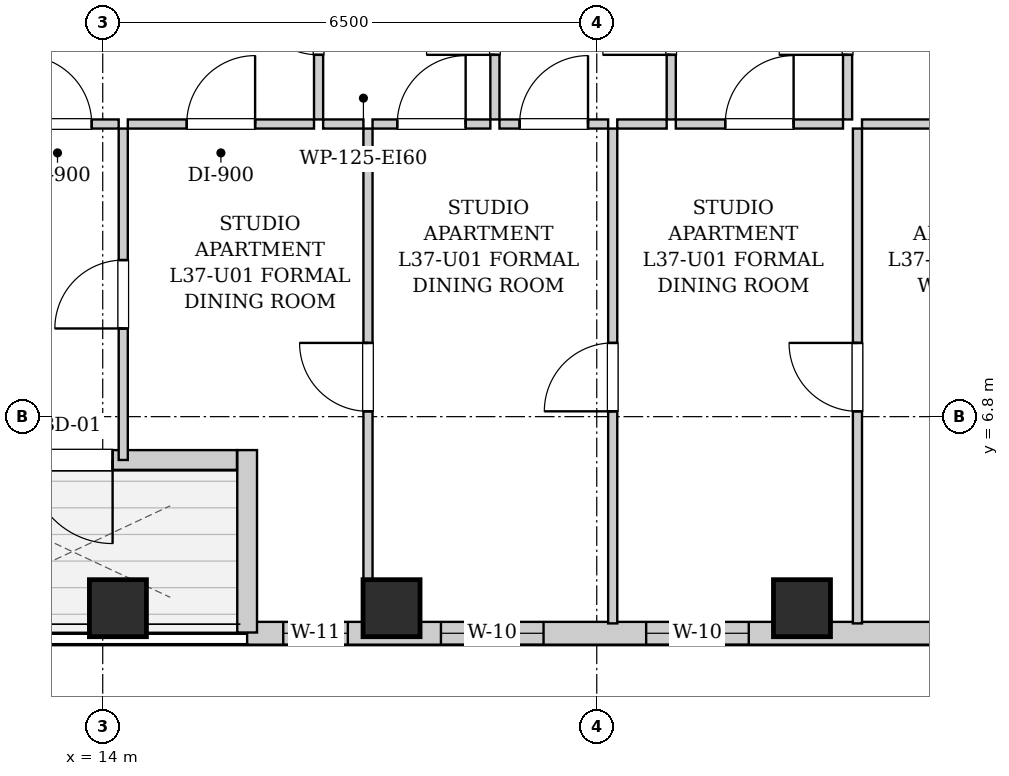
"""IFC4 building model, lengths in metres.
Left out: names, types, materials, properties, quantities, classifications, styles, units other than length and angle.
Written with IfcOpenShell. Run it as: python <this file> out.ifc"""

import sys

from ifc_helpers import new_model, si_unit, direction, frame, frame_2d, origin, origin_2d, place, context, subcontext, project, spatial, rectangle, extrude, element, fill, save


model = new_model("IFC4")
c1 = context("Model", 3, precision=1e-05, world=origin(), true_north=direction((0.0, 1.0)))
c2 = subcontext(c1, "Body", "Model", "MODEL_VIEW")
j1 = project(units=[si_unit("LENGTHUNIT", "METRE"), si_unit("PLANEANGLEUNIT", "RADIAN")], contexts=[c1])
p1 = place(None, origin())
s1 = spatial("IfcSite", under=j1, at=p1, CompositionType="ELEMENT")
p2 = place(p1, origin())
s2 = spatial("IfcBuilding", under=s1, at=p2, CompositionType="ELEMENT")
p3 = place(p2, frame((0.0, 0.0, 130.9)))
s3 = spatial("IfcBuildingStorey", under=s2, at=p3, CompositionType="ELEMENT", Elevation=130.9)
for number, where, z_axis, x_axis in (
    (1, (14.2, 4.28, 0.0), (0.0, 0.0, 1.0), (1.0, 0.0, 0.0)),
    (2, (17.8, 4.28, 0.0), (0.0, 0.0, 1.0), (1.0, 0.0, 0.0)),
    (3, (23.2, 4.28, 0.0), (0.0, 0.0, 1.0), (1.0, 0.0, 0.0)),
):
    element("IfcColumn", number, at=place(p3, frame(where, z_axis=z_axis, x_axis=x_axis)), inside=s3, PredefinedType="COLUMN", context=c2, shape_type="SweptSolid", body=[
        extrude(rectangle(XDim=0.75, YDim=0.75, at=origin_2d()), origin(), (0.0, 0.0, 1.0), 3.25),
    ])
p4 = place(p3, frame((31.5, 3.95, 0.0), z_axis=(0.0, 0.0, 1.0), x_axis=(-1.0, 0.0, 0.0)))
e4 = element("IfcWall", 4, at=p4, inside=s3, PredefinedType="SOLIDWALL", context=c2, shape_type="SweptSolid", body=[
    extrude(rectangle(XDim=15.6, YDim=0.3, at=frame_2d((7.8, 0.0))), origin(), (0.0, 0.0, 1.0), 2.99),
])
p5 = place(p4, frame((14.275, 0.0, 0.55)))
e5 = element("IfcOpeningElement", 5, at=p5, cuts=e4, PredefinedType="OPENING", context=c2, shape_type="SweptSolid", body=[
    extrude(rectangle(XDim=0.85, YDim=1.2, at=frame_2d((0.425, 0.6))), frame((0.0, 0.16, 0.0), z_axis=(0.0, -1.0, 0.0), x_axis=(1.0, 0.0, 0.0)), (0.0, 0.0, 1.0), 0.32),
])
p6 = place(p4, frame((11.7, 0.0, 0.55)))
e6 = element("IfcOpeningElement", 6, at=p6, cuts=e4, PredefinedType="OPENING", context=c2, shape_type="SweptSolid", body=[
    extrude(rectangle(XDim=1.35, YDim=1.2, at=frame_2d((0.675, 0.6))), frame((0.0, 0.16, 0.0), z_axis=(0.0, -1.0, 0.0), x_axis=(1.0, 0.0, 0.0)), (0.0, 0.0, 1.0), 0.32),
])
p7 = place(p4, frame((9.0, 0.0, 0.55)))
e7 = element("IfcOpeningElement", 7, at=p7, cuts=e4, PredefinedType="OPENING", context=c2, shape_type="SweptSolid", body=[
    extrude(rectangle(XDim=1.35, YDim=1.2, at=frame_2d((0.675, 0.6))), frame((0.0, 0.16, 0.0), z_axis=(0.0, -1.0, 0.0), x_axis=(1.0, 0.0, 0.0)), (0.0, 0.0, 1.0), 0.32),
])
p8 = place(p4, frame((2.1, 0.0, 0.55)))
e8 = element("IfcOpeningElement", 8, at=p8, cuts=e4, PredefinedType="OPENING", context=c2, shape_type="SweptSolid", body=[
    extrude(rectangle(XDim=1.35, YDim=1.2, at=frame_2d((0.675, 0.6))), frame((0.0, 0.16, 0.0), z_axis=(0.0, -1.0, 0.0), x_axis=(1.0, 0.0, 0.0)), (0.0, 0.0, 1.0), 0.32),
])
p9 = place(p4, frame((0.23, 0.0, 0.55)))
e9 = element("IfcOpeningElement", 9, at=p9, cuts=e4, PredefinedType="OPENING", context=c2, shape_type="SweptSolid", body=[
    extrude(rectangle(XDim=0.68, YDim=1.2, at=frame_2d((0.34, 0.6))), frame((0.0, 0.16, 0.0), z_axis=(0.0, -1.0, 0.0), x_axis=(1.0, 0.0, 0.0)), (0.0, 0.0, 1.0), 0.32),
])
p10 = place(p3, frame((15.9, 3.96, 0.0), z_axis=(0.0, 0.0, 1.0), x_axis=(0.0, 1.0, 0.0)))
e10 = element("IfcWall", 10, at=p10, inside=s3, PredefinedType="SOLIDWALL", context=c2, shape_type="SweptSolid", body=[
    extrude(rectangle(XDim=2.4, YDim=0.26, at=frame_2d((1.2, 0.0))), origin(), (0.0, 0.0, 1.0), 2.99),
])
p11 = place(p3, frame((15.766, 6.23, 0.0), z_axis=(0.0, 0.0, 1.0), x_axis=(-1.0, 0.0, 0.0)))
e11 = element("IfcWall", 11, at=p11, inside=s3, PredefinedType="SOLIDWALL", context=c2, shape_type="SweptSolid", body=[
    extrude(rectangle(XDim=4.332, YDim=0.26, at=frame_2d((2.166, 0.0))), origin(), (0.0, 0.0, 1.0), 2.99),
])
p12 = place(p11, frame((1.636, 0.0, 0.0)))
e12 = element("IfcOpeningElement", 12, at=p12, cuts=e11, PredefinedType="OPENING", context=c2, shape_type="SweptSolid", body=[
    extrude(rectangle(XDim=1.1, YDim=2.0, at=frame_2d((0.55, 1.0))), frame((0.0, 0.14, 0.0), z_axis=(0.0, -1.0, 0.0), x_axis=(1.0, 0.0, 0.0)), (0.0, 0.0, 1.0), 0.28),
])
p13 = place(p11, frame((2.896, 0.0, 0.55)))
e13 = element("IfcOpeningElement", 13, at=p13, cuts=e11, PredefinedType="OPENING", context=c2, shape_type="SweptSolid", body=[
    extrude(rectangle(XDim=0.85, YDim=1.2, at=frame_2d((0.425, 0.6))), frame((0.0, 0.14, 0.0), z_axis=(0.0, -1.0, 0.0), x_axis=(1.0, 0.0, 0.0)), (0.0, 0.0, 1.0), 0.28),
])
p14 = place(p3, frame((16.84, 10.71, 0.0), z_axis=(0.0, 0.0, 1.0), x_axis=(0.0, 1.0, 0.0)))
e14 = element("IfcWall", 14, at=p14, inside=s3, PredefinedType="PARTITIONING", context=c2, shape_type="SweptSolid", body=[
    extrude(rectangle(XDim=2.6, YDim=0.12, at=frame_2d((1.3, 0.0))), origin(), (0.0, 0.0, 1.0), 2.99),
])
p15 = place(p14, frame((0.85, 0.0, 0.0)))
e15 = element("IfcOpeningElement", 15, at=p15, cuts=e14, PredefinedType="OPENING", context=c2, shape_type="SweptSolid", body=[
    extrude(rectangle(XDim=0.9, YDim=2.05, at=frame_2d((0.45, 1.025))), frame((0.0, 0.07, 0.0), z_axis=(0.0, -1.0, 0.0), x_axis=(1.0, 0.0, 0.0)), (0.0, 0.0, 1.0), 0.14),
])
p16 = place(p3, frame((12.6, 10.65, 0.0), z_axis=(0.0, 0.0, 1.0), x_axis=(1.0, 0.0, 0.0)))
e16 = element("IfcWall", 16, at=p16, inside=s3, PredefinedType="PARTITIONING", context=c2, shape_type="SweptSolid", body=[
    extrude(rectangle(XDim=1.61, YDim=0.12, at=frame_2d((0.805, 0.0))), origin(), (0.0, 0.0, 1.0), 2.99),
])
p17 = place(p16, frame((0.355, 0.0, 0.0)))
e17 = element("IfcOpeningElement", 17, at=p17, cuts=e16, PredefinedType="OPENING", context=c2, shape_type="SweptSolid", body=[
    extrude(rectangle(XDim=0.9, YDim=2.05, at=frame_2d((0.45, 1.025))), frame((0.0, 0.07, 0.0), z_axis=(0.0, -1.0, 0.0), x_axis=(1.0, 0.0, 0.0)), (0.0, 0.0, 1.0), 0.14),
])
p18 = place(p3, frame((14.33, 10.65, 0.0), z_axis=(0.0, 0.0, 1.0), x_axis=(1.0, 0.0, 0.0)))
e18 = element("IfcWall", 18, at=p18, inside=s3, PredefinedType="PARTITIONING", context=c2, shape_type="SweptSolid", body=[
    extrude(rectangle(XDim=2.45, YDim=0.12, at=frame_2d((1.225, 0.0))), origin(), (0.0, 0.0, 1.0), 2.99),
])
p19 = place(p18, frame((0.775, 0.0, 0.0)))
e19 = element("IfcOpeningElement", 19, at=p19, cuts=e18, PredefinedType="OPENING", context=c2, shape_type="SweptSolid", body=[
    extrude(rectangle(XDim=0.9, YDim=2.05, at=frame_2d((0.45, 1.025))), frame((0.0, 0.07, 0.0), z_axis=(0.0, -1.0, 0.0), x_axis=(1.0, 0.0, 0.0)), (0.0, 0.0, 1.0), 0.14),
])
p20 = place(p3, frame((19.16, 10.71, 0.0), z_axis=(0.0, 0.0, 1.0), x_axis=(0.0, 1.0, 0.0)))
e20 = element("IfcWall", 20, at=p20, inside=s3, PredefinedType="PARTITIONING", context=c2, shape_type="SweptSolid", body=[
    extrude(rectangle(XDim=2.6, YDim=0.12, at=frame_2d((1.3, 0.0))), origin(), (0.0, 0.0, 1.0), 2.99),
])
p21 = place(p20, frame((0.85, 0.0, 0.0)))
e21 = element("IfcOpeningElement", 21, at=p21, cuts=e20, PredefinedType="OPENING", context=c2, shape_type="SweptSolid", body=[
    extrude(rectangle(XDim=0.9, YDim=2.05, at=frame_2d((0.45, 1.025))), frame((0.0, 0.07, 0.0), z_axis=(0.0, -1.0, 0.0), x_axis=(1.0, 0.0, 0.0)), (0.0, 0.0, 1.0), 0.14),
])
p22 = place(p3, frame((16.9, 10.65, 0.0), z_axis=(0.0, 0.0, 1.0), x_axis=(1.0, 0.0, 0.0)))
e22 = element("IfcWall", 22, at=p22, inside=s3, PredefinedType="PARTITIONING", context=c2, shape_type="SweptSolid", body=[
    extrude(rectangle(XDim=0.53, YDim=0.12, at=frame_2d((0.265, 0.0))), origin(), (0.0, 0.0, 1.0), 2.99),
])
p23 = place(p3, frame((17.55, 10.65, 0.0), z_axis=(0.0, 0.0, 1.0), x_axis=(1.0, 0.0, 0.0)))
e23 = element("IfcWall", 23, at=p23, inside=s3, PredefinedType="PARTITIONING", context=c2, shape_type="SweptSolid", body=[
    extrude(rectangle(XDim=1.55, YDim=0.12, at=frame_2d((0.775, 0.0))), origin(), (0.0, 0.0, 1.0), 2.99),
])
p24 = place(p23, frame((0.325, 0.0, 0.0)))
e24 = element("IfcOpeningElement", 24, at=p24, cuts=e23, PredefinedType="OPENING", context=c2, shape_type="SweptSolid", body=[
    extrude(rectangle(XDim=0.9, YDim=2.05, at=frame_2d((0.45, 1.025))), frame((0.0, 0.07, 0.0), z_axis=(0.0, -1.0, 0.0), x_axis=(1.0, 0.0, 0.0)), (0.0, 0.0, 1.0), 0.14),
])
p25 = place(p3, frame((21.48, 10.71, 0.0), z_axis=(0.0, 0.0, 1.0), x_axis=(0.0, 1.0, 0.0)))
e25 = element("IfcWall", 25, at=p25, inside=s3, PredefinedType="PARTITIONING", context=c2, shape_type="SweptSolid", body=[
    extrude(rectangle(XDim=2.6, YDim=0.12, at=frame_2d((1.3, 0.0))), origin(), (0.0, 0.0, 1.0), 2.99),
])
p26 = place(p25, frame((0.85, 0.0, 0.0)))
e26 = element("IfcOpeningElement", 26, at=p26, cuts=e25, PredefinedType="OPENING", context=c2, shape_type="SweptSolid", body=[
    extrude(rectangle(XDim=0.9, YDim=2.05, at=frame_2d((0.45, 1.025))), frame((0.0, 0.07, 0.0), z_axis=(0.0, -1.0, 0.0), x_axis=(1.0, 0.0, 0.0)), (0.0, 0.0, 1.0), 0.14),
])
p27 = place(p3, frame((19.22, 10.65, 0.0), z_axis=(0.0, 0.0, 1.0), x_axis=(1.0, 0.0, 0.0)))
e27 = element("IfcWall", 27, at=p27, inside=s3, PredefinedType="PARTITIONING", context=c2, shape_type="SweptSolid", body=[
    extrude(rectangle(XDim=1.43, YDim=0.12, at=frame_2d((0.715, 0.0))), origin(), (0.0, 0.0, 1.0), 2.99),
])
p28 = place(p27, frame((0.265, 0.0, 0.0)))
e28 = element("IfcOpeningElement", 28, at=p28, cuts=e27, PredefinedType="OPENING", context=c2, shape_type="SweptSolid", body=[
    extrude(rectangle(XDim=0.9, YDim=2.05, at=frame_2d((0.45, 1.025))), frame((0.0, 0.07, 0.0), z_axis=(0.0, -1.0, 0.0), x_axis=(1.0, 0.0, 0.0)), (0.0, 0.0, 1.0), 0.14),
])
p29 = place(p3, frame((20.77, 10.65, 0.0), z_axis=(0.0, 0.0, 1.0), x_axis=(1.0, 0.0, 0.0)))
e29 = element("IfcWall", 29, at=p29, inside=s3, PredefinedType="PARTITIONING", context=c2, shape_type="SweptSolid", body=[
    extrude(rectangle(XDim=0.65, YDim=0.12, at=frame_2d((0.325, 0.0))), origin(), (0.0, 0.0, 1.0), 2.99),
])
p30 = place(p3, frame((23.8, 10.71, 0.0), z_axis=(0.0, 0.0, 1.0), x_axis=(0.0, 1.0, 0.0)))
e30 = element("IfcWall", 30, at=p30, inside=s3, PredefinedType="PARTITIONING", context=c2, shape_type="SweptSolid", body=[
    extrude(rectangle(XDim=2.6, YDim=0.12, at=frame_2d((1.3, 0.0))), origin(), (0.0, 0.0, 1.0), 2.99),
])
p31 = place(p30, frame((0.85, 0.0, 0.0)))
e31 = element("IfcOpeningElement", 31, at=p31, cuts=e30, PredefinedType="OPENING", context=c2, shape_type="SweptSolid", body=[
    extrude(rectangle(XDim=0.9, YDim=2.05, at=frame_2d((0.45, 1.025))), frame((0.0, 0.07, 0.0), z_axis=(0.0, -1.0, 0.0), x_axis=(1.0, 0.0, 0.0)), (0.0, 0.0, 1.0), 0.14),
])
p32 = place(p3, frame((21.54, 10.65, 0.0), z_axis=(0.0, 0.0, 1.0), x_axis=(1.0, 0.0, 0.0)))
e32 = element("IfcWall", 32, at=p32, inside=s3, PredefinedType="PARTITIONING", context=c2, shape_type="SweptSolid", body=[
    extrude(rectangle(XDim=2.2, YDim=0.12, at=frame_2d((1.1, 0.0))), origin(), (0.0, 0.0, 1.0), 2.99),
])
p33 = place(p32, frame((0.65, 0.0, 0.0)))
e33 = element("IfcOpeningElement", 33, at=p33, cuts=e32, PredefinedType="OPENING", context=c2, shape_type="SweptSolid", body=[
    extrude(rectangle(XDim=0.9, YDim=2.05, at=frame_2d((0.45, 1.025))), frame((0.0, 0.07, 0.0), z_axis=(0.0, -1.0, 0.0), x_axis=(1.0, 0.0, 0.0)), (0.0, 0.0, 1.0), 0.14),
])
p34 = place(p3, frame((23.99, 10.65, 0.0), z_axis=(0.0, 0.0, 1.0), x_axis=(1.0, 0.0, 0.0)))
e34 = element("IfcWall", 34, at=p34, inside=s3, PredefinedType="PARTITIONING", context=c2, shape_type="SweptSolid", body=[
    extrude(rectangle(XDim=3.1, YDim=0.12, at=frame_2d((1.55, 0.0))), origin(), (0.0, 0.0, 1.0), 2.99),
])
p35 = place(p34, frame((1.1, 0.0, 0.0)))
e35 = element("IfcOpeningElement", 35, at=p35, cuts=e34, PredefinedType="OPENING", context=c2, shape_type="SweptSolid", body=[
    extrude(rectangle(XDim=0.9, YDim=2.05, at=frame_2d((0.45, 1.025))), frame((0.0, 0.07, 0.0), z_axis=(0.0, -1.0, 0.0), x_axis=(1.0, 0.0, 0.0)), (0.0, 0.0, 1.0), 0.14),
])
p36 = place(p3, frame((14.27, 6.23, 0.0), z_axis=(0.0, 0.0, 1.0), x_axis=(0.0, 1.0, 0.0)))
e36 = element("IfcWall", 36, at=p36, inside=s3, PredefinedType="PARTITIONING", context=c2, shape_type="SweptSolid", body=[
    extrude(rectangle(XDim=4.36, YDim=0.12, at=frame_2d((2.18, 0.0))), origin(), (0.0, 0.0, 1.0), 2.99),
])
p37 = place(p36, frame((1.73, 0.0, 0.0)))
e37 = element("IfcOpeningElement", 37, at=p37, cuts=e36, PredefinedType="OPENING", context=c2, shape_type="SweptSolid", body=[
    extrude(rectangle(XDim=0.9, YDim=2.05, at=frame_2d((0.45, 1.025))), frame((0.0, 0.07, 0.0), z_axis=(0.0, -1.0, 0.0), x_axis=(1.0, 0.0, 0.0)), (0.0, 0.0, 1.0), 0.14),
])
p38 = place(p3, frame((17.49, 4.08, 0.0), z_axis=(0.0, 0.0, 1.0), x_axis=(0.0, 1.0, 0.0)))
e38 = element("IfcWall", 38, at=p38, inside=s3, PredefinedType="PARTITIONING", context=c2, shape_type="SweptSolid", body=[
    extrude(rectangle(XDim=6.51, YDim=0.12, at=frame_2d((3.255, 0.0))), origin(), (0.0, 0.0, 1.0), 2.99),
])
p39 = place(p38, frame((2.79, 0.0, 0.0)))
e39 = element("IfcOpeningElement", 39, at=p39, cuts=e38, PredefinedType="OPENING", context=c2, shape_type="SweptSolid", body=[
    extrude(rectangle(XDim=0.9, YDim=2.05, at=frame_2d((0.45, 1.025))), frame((0.0, 0.07, 0.0), z_axis=(0.0, -1.0, 0.0), x_axis=(1.0, 0.0, 0.0)), (0.0, 0.0, 1.0), 0.14),
])
p40 = place(p3, frame((20.71, 4.08, 0.0), z_axis=(0.0, 0.0, 1.0), x_axis=(0.0, 1.0, 0.0)))
e40 = element("IfcWall", 40, at=p40, inside=s3, PredefinedType="PARTITIONING", context=c2, shape_type="SweptSolid", body=[
    extrude(rectangle(XDim=6.51, YDim=0.12, at=frame_2d((3.255, 0.0))), origin(), (0.0, 0.0, 1.0), 2.99),
])
p41 = place(p40, frame((2.79, 0.0, 0.0)))
e41 = element("IfcOpeningElement", 41, at=p41, cuts=e40, PredefinedType="OPENING", context=c2, shape_type="SweptSolid", body=[
    extrude(rectangle(XDim=0.9, YDim=2.05, at=frame_2d((0.45, 1.025))), frame((0.0, 0.07, 0.0), z_axis=(0.0, -1.0, 0.0), x_axis=(1.0, 0.0, 0.0)), (0.0, 0.0, 1.0), 0.14),
])
p42 = place(p3, frame((23.93, 4.08, 0.0), z_axis=(0.0, 0.0, 1.0), x_axis=(0.0, 1.0, 0.0)))
e42 = element("IfcWall", 42, at=p42, inside=s3, PredefinedType="PARTITIONING", context=c2, shape_type="SweptSolid", body=[
    extrude(rectangle(XDim=6.51, YDim=0.12, at=frame_2d((3.255, 0.0))), origin(), (0.0, 0.0, 1.0), 2.99),
])
p43 = place(p42, frame((2.79, 0.0, 0.0)))
e43 = element("IfcOpeningElement", 43, at=p43, cuts=e42, PredefinedType="OPENING", context=c2, shape_type="SweptSolid", body=[
    extrude(rectangle(XDim=0.9, YDim=2.05, at=frame_2d((0.45, 1.025))), frame((0.0, 0.07, 0.0), z_axis=(0.0, -1.0, 0.0), x_axis=(1.0, 0.0, 0.0)), (0.0, 0.0, 1.0), 0.14),
])
p44 = place(p15, origin())
e44 = element("IfcDoor", 44, at=p44, inside=s3, OperationType="SINGLE_SWING_RIGHT", PredefinedType="DOOR", context=c2, shape_type="SweptSolid", body=[
    extrude(rectangle(XDim=0.9, YDim=2.05, at=frame_2d((0.45, 1.025))), frame((0.0, 0.025, 0.0), z_axis=(0.0, -1.0, 0.0), x_axis=(1.0, 0.0, 0.0)), (0.0, 0.0, 1.0), 0.05),
])
fill(e15, e44)
p45 = place(p17, origin())
e45 = element("IfcDoor", 45, at=p45, inside=s3, OperationType="SINGLE_SWING_LEFT", PredefinedType="DOOR", context=c2, shape_type="SweptSolid", body=[
    extrude(rectangle(XDim=0.9, YDim=2.05, at=frame_2d((0.45, 1.025))), frame((0.0, 0.025, 0.0), z_axis=(0.0, -1.0, 0.0), x_axis=(1.0, 0.0, 0.0)), (0.0, 0.0, 1.0), 0.05),
])
fill(e17, e45)
p46 = place(p19, origin())
e46 = element("IfcDoor", 46, at=p46, inside=s3, OperationType="SINGLE_SWING_RIGHT", PredefinedType="DOOR", context=c2, shape_type="SweptSolid", body=[
    extrude(rectangle(XDim=0.9, YDim=2.05, at=frame_2d((0.45, 1.025))), frame((0.0, 0.025, 0.0), z_axis=(0.0, -1.0, 0.0), x_axis=(1.0, 0.0, 0.0)), (0.0, 0.0, 1.0), 0.05),
])
fill(e19, e46)
p47 = place(p21, origin())
e47 = element("IfcDoor", 47, at=p47, inside=s3, OperationType="SINGLE_SWING_LEFT", PredefinedType="DOOR", context=c2, shape_type="SweptSolid", body=[
    extrude(rectangle(XDim=0.9, YDim=2.05, at=frame_2d((0.45, 1.025))), frame((0.0, 0.025, 0.0), z_axis=(0.0, -1.0, 0.0), x_axis=(1.0, 0.0, 0.0)), (0.0, 0.0, 1.0), 0.05),
])
fill(e21, e47)
p48 = place(p24, origin())
e48 = element("IfcDoor", 48, at=p48, inside=s3, OperationType="SINGLE_SWING_RIGHT", PredefinedType="DOOR", context=c2, shape_type="SweptSolid", body=[
    extrude(rectangle(XDim=0.9, YDim=2.05, at=frame_2d((0.45, 1.025))), frame((0.0, 0.025, 0.0), z_axis=(0.0, -1.0, 0.0), x_axis=(1.0, 0.0, 0.0)), (0.0, 0.0, 1.0), 0.05),
])
fill(e24, e48)
p49 = place(p26, origin())
e49 = element("IfcDoor", 49, at=p49, inside=s3, OperationType="SINGLE_SWING_LEFT", PredefinedType="DOOR", context=c2, shape_type="SweptSolid", body=[
    extrude(rectangle(XDim=0.9, YDim=2.05, at=frame_2d((0.45, 1.025))), frame((0.0, 0.025, 0.0), z_axis=(0.0, -1.0, 0.0), x_axis=(1.0, 0.0, 0.0)), (0.0, 0.0, 1.0), 0.05),
])
fill(e26, e49)
p50 = place(p28, origin())
e50 = element("IfcDoor", 50, at=p50, inside=s3, OperationType="SINGLE_SWING_RIGHT", PredefinedType="DOOR", context=c2, shape_type="SweptSolid", body=[
    extrude(rectangle(XDim=0.9, YDim=2.05, at=frame_2d((0.45, 1.025))), frame((0.0, 0.025, 0.0), z_axis=(0.0, -1.0, 0.0), x_axis=(1.0, 0.0, 0.0)), (0.0, 0.0, 1.0), 0.05),
])
fill(e28, e50)
p51 = place(p31, origin())
e51 = element("IfcDoor", 51, at=p51, inside=s3, OperationType="SINGLE_SWING_LEFT", PredefinedType="DOOR", context=c2, shape_type="SweptSolid", body=[
    extrude(rectangle(XDim=0.9, YDim=2.05, at=frame_2d((0.45, 1.025))), frame((0.0, 0.025, 0.0), z_axis=(0.0, -1.0, 0.0), x_axis=(1.0, 0.0, 0.0)), (0.0, 0.0, 1.0), 0.05),
])
fill(e31, e51)
p52 = place(p33, origin())
e52 = element("IfcDoor", 52, at=p52, inside=s3, OperationType="SINGLE_SWING_RIGHT", PredefinedType="DOOR", context=c2, shape_type="SweptSolid", body=[
    extrude(rectangle(XDim=0.9, YDim=2.05, at=frame_2d((0.45, 1.025))), frame((0.0, 0.025, 0.0), z_axis=(0.0, -1.0, 0.0), x_axis=(1.0, 0.0, 0.0)), (0.0, 0.0, 1.0), 0.05),
])
fill(e33, e52)
p53 = place(p37, origin())
e53 = element("IfcDoor", 53, at=p53, inside=s3, OperationType="SINGLE_SWING_LEFT", PredefinedType="DOOR", context=c2, shape_type="SweptSolid", body=[
    extrude(rectangle(XDim=0.9, YDim=2.05, at=frame_2d((0.45, 1.025))), frame((0.0, 0.025, 0.0), z_axis=(0.0, -1.0, 0.0), x_axis=(1.0, 0.0, 0.0)), (0.0, 0.0, 1.0), 0.05),
])
fill(e37, e53)
p54 = place(p39, origin())
e54 = element("IfcDoor", 54, at=p54, inside=s3, OperationType="SINGLE_SWING_RIGHT", PredefinedType="DOOR", context=c2, shape_type="SweptSolid", body=[
    extrude(rectangle(XDim=0.9, YDim=2.05, at=frame_2d((0.45, 1.025))), frame((0.0, 0.025, 0.0), z_axis=(0.0, -1.0, 0.0), x_axis=(1.0, 0.0, 0.0)), (0.0, 0.0, 1.0), 0.05),
])
fill(e39, e54)
p55 = place(p41, origin())
e55 = element("IfcDoor", 55, at=p55, inside=s3, OperationType="SINGLE_SWING_LEFT", PredefinedType="DOOR", context=c2, shape_type="SweptSolid", body=[
    extrude(rectangle(XDim=0.9, YDim=2.05, at=frame_2d((0.45, 1.025))), frame((0.0, 0.025, 0.0), z_axis=(0.0, -1.0, 0.0), x_axis=(1.0, 0.0, 0.0)), (0.0, 0.0, 1.0), 0.05),
])
fill(e41, e55)
p56 = place(p43, origin())
e56 = element("IfcDoor", 56, at=p56, inside=s3, OperationType="SINGLE_SWING_RIGHT", PredefinedType="DOOR", context=c2, shape_type="SweptSolid", body=[
    extrude(rectangle(XDim=0.9, YDim=2.05, at=frame_2d((0.45, 1.025))), frame((0.0, 0.025, 0.0), z_axis=(0.0, -1.0, 0.0), x_axis=(1.0, 0.0, 0.0)), (0.0, 0.0, 1.0), 0.05),
])
fill(e43, e56)
p57 = place(p12, origin())
e57 = element("IfcDoor", 57, at=p57, inside=s3, OperationType="SINGLE_SWING_LEFT", PredefinedType="DOOR", context=c2, shape_type="SweptSolid", body=[
    extrude(rectangle(XDim=1.1, YDim=2.0, at=frame_2d((0.55, 1.0))), frame((0.0, 0.025, 0.0), z_axis=(0.0, -1.0, 0.0), x_axis=(1.0, 0.0, 0.0)), (0.0, 0.0, 1.0), 0.05),
])
fill(e12, e57)
p58 = place(p5, origin())
e58 = element("IfcWindow", 58, at=p58, inside=s3, PartitioningType="SINGLE_PANEL", PredefinedType="WINDOW", context=c2, shape_type="SweptSolid", body=[
    extrude(rectangle(XDim=0.85, YDim=1.2, at=frame_2d((0.425, 0.6))), frame((0.0, 0.03, 0.0), z_axis=(0.0, -1.0, 0.0), x_axis=(1.0, 0.0, 0.0)), (0.0, 0.0, 1.0), 0.06),
])
fill(e5, e58)
p59 = place(p6, origin())
e59 = element("IfcWindow", 59, at=p59, inside=s3, PartitioningType="SINGLE_PANEL", PredefinedType="WINDOW", context=c2, shape_type="SweptSolid", body=[
    extrude(rectangle(XDim=1.35, YDim=1.2, at=frame_2d((0.675, 0.6))), frame((0.0, 0.03, 0.0), z_axis=(0.0, -1.0, 0.0), x_axis=(1.0, 0.0, 0.0)), (0.0, 0.0, 1.0), 0.06),
])
fill(e6, e59)
p60 = place(p7, origin())
e60 = element("IfcWindow", 60, at=p60, inside=s3, PartitioningType="SINGLE_PANEL", PredefinedType="WINDOW", context=c2, shape_type="SweptSolid", body=[
    extrude(rectangle(XDim=1.35, YDim=1.2, at=frame_2d((0.675, 0.6))), frame((0.0, 0.03, 0.0), z_axis=(0.0, -1.0, 0.0), x_axis=(1.0, 0.0, 0.0)), (0.0, 0.0, 1.0), 0.06),
])
fill(e7, e60)
save(model, sys.argv[1])
